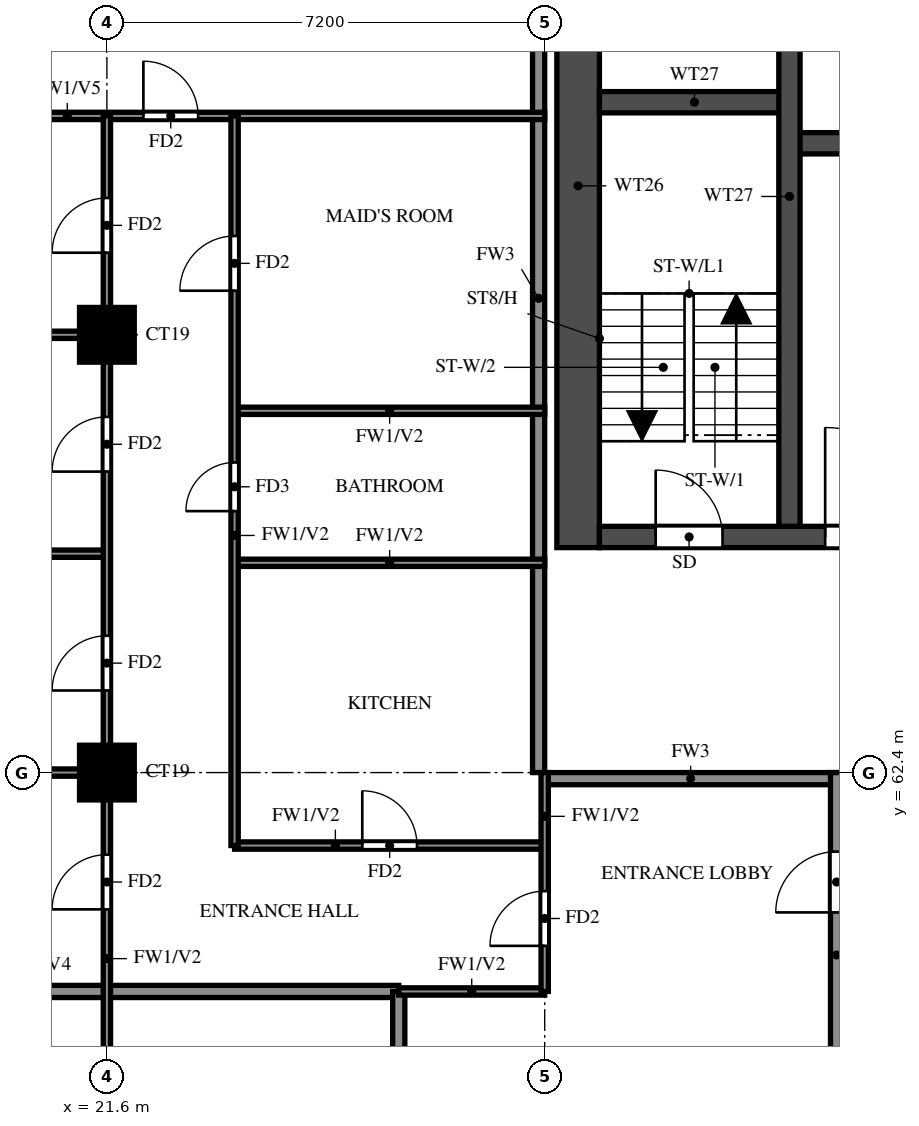
"""IFC4 building model, lengths in metres.
Left out: names, types, materials, properties, quantities, classifications, styles, units other than length and angle.
Written with IfcOpenShell. Run it as: python <this file> out.ifc"""

import sys

from ifc_helpers import new_model, si_unit, direction, frame, frame_2d, origin, origin_2d, place, context, subcontext, project, spatial, rectangle, extrude, source, transform, mapped, element, fill, save


model = new_model("IFC4")
c1 = context("Model", 3, precision=1e-05, world=origin(), true_north=direction((0.0, 1.0)))
c2 = subcontext(c1, "Body", "Model", "MODEL_VIEW")
j1 = project(units=[si_unit("LENGTHUNIT", "METRE"), si_unit("PLANEANGLEUNIT", "RADIAN")], contexts=[c1])
p1 = place(None, origin())
s1 = spatial("IfcSite", under=j1, at=p1, CompositionType="ELEMENT")
p2 = place(p1, origin())
s2 = spatial("IfcBuilding", under=s1, at=p2, CompositionType="ELEMENT")
p3 = place(p2, frame((0.0, 0.0, 185.0)))
s3 = spatial("IfcBuildingStorey", under=s2, at=p3, CompositionType="ELEMENT", Elevation=185.0)
m1 = source(origin(), c2, "Body", "SweptSolid", [
    extrude(rectangle(XDim=0.9, YDim=0.9, at=origin_2d()), origin(), (0.0, 0.0, 1.0), 3.2),
])
for number, where, z_axis, x_axis in (
    (1, (21.6, 62.4, 0.0), (0.0, 0.0, 1.0), (1.0, 0.0, 0.0)),
    (2, (21.6, 69.6, 0.0), (0.0, 0.0, 1.0), (1.0, 0.0, 0.0)),
):
    element("IfcColumn", number, at=place(p3, frame(where, z_axis=z_axis, x_axis=x_axis)), inside=s3, PredefinedType="COLUMN", context=c2, shape_type="MappedRepresentation", body=[
        mapped(m1, transform((0.0, 0.0, 0.0))),
    ])
p4 = place(p3, frame((29.35, 66.1, 0.0), z_axis=(0.0, 0.0, 1.0), x_axis=(0.0, 1.0, 0.0)))
e3 = element("IfcWall", 3, at=p4, inside=s3, PredefinedType="SHEAR", context=c2, shape_type="SweptSolid", body=[
    extrude(rectangle(XDim=11.9, YDim=0.7, at=frame_2d((5.95, 0.0))), origin(), (0.0, 0.0, 1.0), 3.2),
])
p5 = place(p3, frame((29.7, 66.275, 0.0), z_axis=(0.0, 0.0, 1.0), x_axis=(1.0, 0.0, 0.0)))
e4 = element("IfcWall", 4, at=p5, inside=s3, PredefinedType="SHEAR", context=c2, shape_type="SweptSolid", body=[
    extrude(rectangle(XDim=41.4, YDim=0.35, at=frame_2d((20.7, 0.0))), origin(), (0.0, 0.0, 1.0), 3.2),
])
p6 = place(p5, frame((0.925, 0.0, 0.0)))
e5 = element("IfcOpeningElement", 5, at=p6, cuts=e4, PredefinedType="OPENING", context=c2, shape_type="SweptSolid", body=[
    extrude(rectangle(XDim=1.1, YDim=2.1, at=frame_2d((0.55, 1.05))), frame((0.0, 0.185, 0.0), z_axis=(0.0, -1.0, 0.0), x_axis=(1.0, 0.0, 0.0)), (0.0, 0.0, 1.0), 0.37),
])
p7 = place(p5, frame((3.712, 0.0, 0.0)))
e6 = element("IfcOpeningElement", 6, at=p7, cuts=e4, PredefinedType="OPENING", context=c2, shape_type="SweptSolid", body=[
    extrude(rectangle(XDim=1.8, YDim=2.1, at=frame_2d((0.9, 1.05))), frame((0.0, 0.185, 0.0), z_axis=(0.0, -1.0, 0.0), x_axis=(1.0, 0.0, 0.0)), (0.0, 0.0, 1.0), 0.37),
])
p8 = place(p3, frame((32.825, 72.75, 0.0), z_axis=(0.0, 0.0, 1.0), x_axis=(1.0, 0.0, 0.0)))
e7 = element("IfcWall", 7, at=p8, inside=s3, PredefinedType="SHEAR", context=c2, shape_type="SweptSolid", body=[
    extrude(rectangle(XDim=35.15, YDim=0.35, at=frame_2d((17.575, 0.0))), origin(), (0.0, 0.0, 1.0), 3.2),
])
p9 = place(p8, frame((19.8, 0.0, 0.0)))
e8 = element("IfcOpeningElement", 8, at=p9, cuts=e7, PredefinedType="OPENING", context=c2, shape_type="SweptSolid", body=[
    extrude(rectangle(XDim=1.1, YDim=2.1, at=frame_2d((0.55, 1.05))), frame((0.0, 0.185, 0.0), z_axis=(0.0, -1.0, 0.0), x_axis=(1.0, 0.0, 0.0)), (0.0, 0.0, 1.0), 0.37),
])
p10 = place(p8, frame((27.7, 0.0, 0.0)))
e9 = element("IfcOpeningElement", 9, at=p10, cuts=e7, PredefinedType="OPENING", context=c2, shape_type="SweptSolid", body=[
    extrude(rectangle(XDim=1.1, YDim=2.1, at=frame_2d((0.55, 1.05))), frame((0.0, 0.185, 0.0), z_axis=(0.0, -1.0, 0.0), x_axis=(1.0, 0.0, 0.0)), (0.0, 0.0, 1.0), 0.37),
])
p11 = place(p8, frame((30.3, 0.0, 0.0)))
e10 = element("IfcOpeningElement", 10, at=p11, cuts=e7, PredefinedType="OPENING", context=c2, shape_type="SweptSolid", body=[
    extrude(rectangle(XDim=1.1, YDim=2.1, at=frame_2d((0.55, 1.05))), frame((0.0, 0.185, 0.0), z_axis=(0.0, -1.0, 0.0), x_axis=(1.0, 0.0, 0.0)), (0.0, 0.0, 1.0), 0.37),
])
p12 = place(p8, frame((3.8, 0.0, 0.0)))
e11 = element("IfcOpeningElement", 11, at=p12, cuts=e7, PredefinedType="OPENING", context=c2, shape_type="SweptSolid", body=[
    extrude(rectangle(XDim=1.1, YDim=2.1, at=frame_2d((0.55, 1.05))), frame((0.0, 0.185, 0.0), z_axis=(0.0, -1.0, 0.0), x_axis=(1.0, 0.0, 0.0)), (0.0, 0.0, 1.0), 0.37),
])
p13 = place(p8, frame((6.55, 0.0, 0.0)))
e12 = element("IfcOpeningElement", 12, at=p13, cuts=e7, PredefinedType="OPENING", context=c2, shape_type="SweptSolid", body=[
    extrude(rectangle(XDim=1.1, YDim=2.1, at=frame_2d((0.55, 1.05))), frame((0.0, 0.185, 0.0), z_axis=(0.0, -1.0, 0.0), x_axis=(1.0, 0.0, 0.0)), (0.0, 0.0, 1.0), 0.37),
])
p14 = place(p8, frame((9.3, 0.0, 0.0)))
e13 = element("IfcOpeningElement", 13, at=p14, cuts=e7, PredefinedType="OPENING", context=c2, shape_type="SweptSolid", body=[
    extrude(rectangle(XDim=1.1, YDim=2.1, at=frame_2d((0.55, 1.05))), frame((0.0, 0.185, 0.0), z_axis=(0.0, -1.0, 0.0), x_axis=(1.0, 0.0, 0.0)), (0.0, 0.0, 1.0), 0.37),
])
p15 = place(p8, frame((12.05, 0.0, 0.0)))
e14 = element("IfcOpeningElement", 14, at=p15, cuts=e7, PredefinedType="OPENING", context=c2, shape_type="SweptSolid", body=[
    extrude(rectangle(XDim=1.1, YDim=2.1, at=frame_2d((0.55, 1.05))), frame((0.0, 0.185, 0.0), z_axis=(0.0, -1.0, 0.0), x_axis=(1.0, 0.0, 0.0)), (0.0, 0.0, 1.0), 0.37),
])
p16 = place(p8, frame((14.8, 0.0, 0.0)))
e15 = element("IfcOpeningElement", 15, at=p16, cuts=e7, PredefinedType="OPENING", context=c2, shape_type="SweptSolid", body=[
    extrude(rectangle(XDim=1.1, YDim=2.1, at=frame_2d((0.55, 1.05))), frame((0.0, 0.185, 0.0), z_axis=(0.0, -1.0, 0.0), x_axis=(1.0, 0.0, 0.0)), (0.0, 0.0, 1.0), 0.37),
])
p17 = place(p8, frame((17.55, 0.0, 0.0)))
e16 = element("IfcOpeningElement", 16, at=p17, cuts=e7, PredefinedType="OPENING", context=c2, shape_type="SweptSolid", body=[
    extrude(rectangle(XDim=1.1, YDim=2.1, at=frame_2d((0.55, 1.05))), frame((0.0, 0.185, 0.0), z_axis=(0.0, -1.0, 0.0), x_axis=(1.0, 0.0, 0.0)), (0.0, 0.0, 1.0), 0.37),
])
p18 = place(p8, frame((0.938, 0.0, 0.0)))
e17 = element("IfcOpeningElement", 17, at=p18, cuts=e7, PredefinedType="OPENING", context=c2, shape_type="SweptSolid", body=[
    extrude(rectangle(XDim=1.1, YDim=2.1, at=frame_2d((0.55, 1.05))), frame((0.0, 0.185, 0.0), z_axis=(0.0, -1.0, 0.0), x_axis=(1.0, 0.0, 0.0)), (0.0, 0.0, 1.0), 0.37),
])
p19 = place(p3, frame((29.7, 73.425, 0.0), z_axis=(0.0, 0.0, 1.0), x_axis=(1.0, 0.0, 0.0)))
e18 = element("IfcWall", 18, at=p19, inside=s3, PredefinedType="SHEAR", context=c2, shape_type="SweptSolid", body=[
    extrude(rectangle(XDim=3.125, YDim=0.35, at=frame_2d((1.562, 0.0))), origin(), (0.0, 0.0, 1.0), 3.2),
])
p20 = place(p3, frame((32.825, 66.45, 0.0), z_axis=(0.0, 0.0, 1.0), x_axis=(0.0, 1.0, 0.0)))
e19 = element("IfcWall", 19, at=p20, inside=s3, PredefinedType="SHEAR", context=c2, shape_type="SweptSolid", body=[
    extrude(rectangle(XDim=10.85, YDim=0.35, at=frame_2d((5.425, 0.0))), origin(), (0.0, 0.0, 1.0), 3.2),
])
p21 = place(p3, frame((28.8, 62.3, 0.0), z_axis=(0.0, 0.0, 1.0), x_axis=(1.0, 0.0, 0.0)))
e20 = element("IfcWall", 20, at=p21, inside=s3, PredefinedType="SOLIDWALL", context=c2, shape_type="SweptSolid", body=[
    extrude(rectangle(XDim=4.8, YDim=0.2, at=frame_2d((2.4, 0.0))), origin(), (0.0, 0.0, 1.0), 3.2),
])
p22 = place(p3, frame((28.7, 62.4, 0.0), z_axis=(0.0, 0.0, 1.0), x_axis=(0.0, 1.0, 0.0)))
e21 = element("IfcWall", 21, at=p22, inside=s3, PredefinedType="SOLIDWALL", context=c2, shape_type="SweptSolid", body=[
    extrude(rectangle(XDim=15.6, YDim=0.2, at=frame_2d((7.8, 0.0))), origin(), (0.0, 0.0, 1.0), 3.2),
])
p23 = place(p3, frame((33.6, 56.4, 0.0), z_axis=(0.0, 0.0, 1.0), x_axis=(0.0, 1.0, 0.0)))
e22 = element("IfcWall", 22, at=p23, inside=s3, PredefinedType="SOLIDWALL", context=c2, shape_type="SweptSolid", body=[
    extrude(rectangle(XDim=6.0, YDim=0.2, at=frame_2d((3.0, 0.0))), origin(), (0.0, 0.0, 1.0), 3.2),
])
p24 = place(p23, frame((3.7, 0.0, 0.0)))
e23 = element("IfcOpeningElement", 23, at=p24, cuts=e22, PredefinedType="OPENING", context=c2, shape_type="SweptSolid", body=[
    extrude(rectangle(XDim=1.0, YDim=2.1, at=frame_2d((0.5, 1.05))), frame((0.0, 0.11, 0.0), z_axis=(0.0, -1.0, 0.0), x_axis=(1.0, 0.0, 0.0)), (0.0, 0.0, 1.0), 0.22),
])
p25 = place(p3, frame((14.525, 58.8, 0.0), z_axis=(0.0, 0.0, 1.0), x_axis=(1.0, 0.0, 0.0)))
e24 = element("IfcWall", 24, at=p25, inside=s3, PredefinedType="SOLIDWALL", context=c2, shape_type="SweptSolid", body=[
    extrude(rectangle(XDim=11.875, YDim=0.2, at=frame_2d((5.938, 0.0))), origin(), (0.0, 0.0, 1.0), 2.3),
])
p26 = place(p3, frame((26.4, 56.4, 0.0), z_axis=(0.0, 0.0, 1.0), x_axis=(0.0, 1.0, 0.0)))
e25 = element("IfcWall", 25, at=p26, inside=s3, PredefinedType="SOLIDWALL", context=c2, shape_type="SweptSolid", body=[
    extrude(rectangle(XDim=2.4, YDim=0.2, at=frame_2d((1.2, 0.0))), origin(), (0.0, 0.0, 1.0), 3.2),
])
p27 = place(p3, frame((26.4, 58.8, 0.0), z_axis=(0.0, 0.0, 1.0), x_axis=(1.0, 0.0, 0.0)))
e26 = element("IfcWall", 26, at=p27, inside=s3, PredefinedType="PARTITIONING", context=c2, shape_type="SweptSolid", body=[
    extrude(rectangle(XDim=2.4, YDim=0.12, at=frame_2d((1.2, 0.0))), origin(), (0.0, 0.0, 1.0), 3.2),
])
p28 = place(p3, frame((23.7, 61.2, 0.0), z_axis=(0.0, 0.0, 1.0), x_axis=(1.0, 0.0, 0.0)))
e27 = element("IfcWall", 27, at=p28, inside=s3, PredefinedType="PARTITIONING", context=c2, shape_type="SweptSolid", body=[
    extrude(rectangle(XDim=5.1, YDim=0.12, at=frame_2d((2.55, 0.0))), origin(), (0.0, 0.0, 1.0), 3.2),
])
p29 = place(p28, frame((2.1, 0.0, 0.0)))
e28 = element("IfcOpeningElement", 28, at=p29, cuts=e27, PredefinedType="OPENING", context=c2, shape_type="SweptSolid", body=[
    extrude(rectangle(XDim=0.9, YDim=2.1, at=frame_2d((0.45, 1.05))), frame((0.0, 0.07, 0.0), z_axis=(0.0, -1.0, 0.0), x_axis=(1.0, 0.0, 0.0)), (0.0, 0.0, 1.0), 0.14),
])
p30 = place(p3, frame((14.525, 62.4, 0.0), z_axis=(0.0, 0.0, 1.0), x_axis=(1.0, 0.0, 0.0)))
e29 = element("IfcWall", 29, at=p30, inside=s3, PredefinedType="PARTITIONING", context=c2, shape_type="SweptSolid", body=[
    extrude(rectangle(XDim=7.075, YDim=0.12, at=frame_2d((3.538, 0.0))), origin(), (0.0, 0.0, 1.0), 3.2),
])
p31 = place(p3, frame((23.7, 65.85, 0.0), z_axis=(0.0, 0.0, 1.0), x_axis=(1.0, 0.0, 0.0)))
e30 = element("IfcWall", 30, at=p31, inside=s3, PredefinedType="PARTITIONING", context=c2, shape_type="SweptSolid", body=[
    extrude(rectangle(XDim=5.1, YDim=0.12, at=frame_2d((2.55, 0.0))), origin(), (0.0, 0.0, 1.0), 3.2),
])
p32 = place(p3, frame((14.525, 66.0, 0.0), z_axis=(0.0, 0.0, 1.0), x_axis=(1.0, 0.0, 0.0)))
e31 = element("IfcWall", 31, at=p32, inside=s3, PredefinedType="PARTITIONING", context=c2, shape_type="SweptSolid", body=[
    extrude(rectangle(XDim=7.075, YDim=0.12, at=frame_2d((3.538, 0.0))), origin(), (0.0, 0.0, 1.0), 2.3),
])
p33 = place(p3, frame((23.7, 68.35, 0.0), z_axis=(0.0, 0.0, 1.0), x_axis=(1.0, 0.0, 0.0)))
e32 = element("IfcWall", 32, at=p33, inside=s3, PredefinedType="PARTITIONING", context=c2, shape_type="SweptSolid", body=[
    extrude(rectangle(XDim=5.1, YDim=0.12, at=frame_2d((2.55, 0.0))), origin(), (0.0, 0.0, 1.0), 3.2),
])
p34 = place(p3, frame((14.525, 69.6, 0.0), z_axis=(0.0, 0.0, 1.0), x_axis=(1.0, 0.0, 0.0)))
e33 = element("IfcWall", 33, at=p34, inside=s3, PredefinedType="PARTITIONING", context=c2, shape_type="SweptSolid", body=[
    extrude(rectangle(XDim=7.075, YDim=0.12, at=frame_2d((3.538, 0.0))), origin(), (0.0, 0.0, 1.0), 3.2),
])
p35 = place(p3, frame((14.525, 73.2, 0.0), z_axis=(0.0, 0.0, 1.0), x_axis=(1.0, 0.0, 0.0)))
e34 = element("IfcWall", 34, at=p35, inside=s3, PredefinedType="PARTITIONING", context=c2, shape_type="SweptSolid", body=[
    extrude(rectangle(XDim=14.275, YDim=0.12, at=frame_2d((7.138, 0.0))), origin(), (0.0, 0.0, 1.0), 2.3),
])
p36 = place(p35, frame((7.675, 0.0, 0.0)))
e35 = element("IfcOpeningElement", 35, at=p36, cuts=e34, PredefinedType="OPENING", context=c2, shape_type="SweptSolid", body=[
    extrude(rectangle(XDim=0.9, YDim=2.1, at=frame_2d((0.45, 1.05))), frame((0.0, 0.07, 0.0), z_axis=(0.0, -1.0, 0.0), x_axis=(1.0, 0.0, 0.0)), (0.0, 0.0, 1.0), 0.14),
])
p37 = place(p3, frame((21.6, 48.0, 0.0), z_axis=(0.0, 0.0, 1.0), x_axis=(0.0, 1.0, 0.0)))
e36 = element("IfcWall", 36, at=p37, inside=s3, PredefinedType="PARTITIONING", context=c2, shape_type="SweptSolid", body=[
    extrude(rectangle(XDim=25.2, YDim=0.12, at=frame_2d((12.6, 0.0))), origin(), (0.0, 0.0, 1.0), 3.2),
])
p38 = place(p37, frame((1.35, 0.0, 0.0)))
e37 = element("IfcOpeningElement", 37, at=p38, cuts=e36, PredefinedType="OPENING", context=c2, shape_type="SweptSolid", body=[
    extrude(rectangle(XDim=0.9, YDim=2.1, at=frame_2d((0.45, 1.05))), frame((0.0, 0.07, 0.0), z_axis=(0.0, -1.0, 0.0), x_axis=(1.0, 0.0, 0.0)), (0.0, 0.0, 1.0), 0.14),
])
p39 = place(p37, frame((4.95, 0.0, 0.0)))
e38 = element("IfcOpeningElement", 38, at=p39, cuts=e36, PredefinedType="OPENING", context=c2, shape_type="SweptSolid", body=[
    extrude(rectangle(XDim=0.9, YDim=2.1, at=frame_2d((0.45, 1.05))), frame((0.0, 0.07, 0.0), z_axis=(0.0, -1.0, 0.0), x_axis=(1.0, 0.0, 0.0)), (0.0, 0.0, 1.0), 0.14),
])
p40 = place(p37, frame((8.25, 0.0, 0.0)))
e39 = element("IfcOpeningElement", 39, at=p40, cuts=e36, PredefinedType="OPENING", context=c2, shape_type="SweptSolid", body=[
    extrude(rectangle(XDim=1.5, YDim=2.1, at=frame_2d((0.75, 1.05))), frame((0.0, 0.07, 0.0), z_axis=(0.0, -1.0, 0.0), x_axis=(1.0, 0.0, 0.0)), (0.0, 0.0, 1.0), 0.14),
])
p41 = place(p37, frame((12.15, 0.0, 0.0)))
e40 = element("IfcOpeningElement", 40, at=p41, cuts=e36, PredefinedType="OPENING", context=c2, shape_type="SweptSolid", body=[
    extrude(rectangle(XDim=0.9, YDim=2.1, at=frame_2d((0.45, 1.05))), frame((0.0, 0.07, 0.0), z_axis=(0.0, -1.0, 0.0), x_axis=(1.0, 0.0, 0.0)), (0.0, 0.0, 1.0), 0.14),
])
p42 = place(p37, frame((15.75, 0.0, 0.0)))
e41 = element("IfcOpeningElement", 41, at=p42, cuts=e36, PredefinedType="OPENING", context=c2, shape_type="SweptSolid", body=[
    extrude(rectangle(XDim=0.9, YDim=2.1, at=frame_2d((0.45, 1.05))), frame((0.0, 0.07, 0.0), z_axis=(0.0, -1.0, 0.0), x_axis=(1.0, 0.0, 0.0)), (0.0, 0.0, 1.0), 0.14),
])
p43 = place(p37, frame((19.35, 0.0, 0.0)))
e42 = element("IfcOpeningElement", 42, at=p43, cuts=e36, PredefinedType="OPENING", context=c2, shape_type="SweptSolid", body=[
    extrude(rectangle(XDim=0.9, YDim=2.1, at=frame_2d((0.45, 1.05))), frame((0.0, 0.07, 0.0), z_axis=(0.0, -1.0, 0.0), x_axis=(1.0, 0.0, 0.0)), (0.0, 0.0, 1.0), 0.14),
])
p44 = place(p37, frame((22.95, 0.0, 0.0)))
e43 = element("IfcOpeningElement", 43, at=p44, cuts=e36, PredefinedType="OPENING", context=c2, shape_type="SweptSolid", body=[
    extrude(rectangle(XDim=0.9, YDim=2.1, at=frame_2d((0.45, 1.05))), frame((0.0, 0.07, 0.0), z_axis=(0.0, -1.0, 0.0), x_axis=(1.0, 0.0, 0.0)), (0.0, 0.0, 1.0), 0.14),
])
p45 = place(p3, frame((23.7, 61.2, 0.0), z_axis=(0.0, 0.0, 1.0), x_axis=(0.0, 1.0, 0.0)))
e44 = element("IfcWall", 44, at=p45, inside=s3, PredefinedType="PARTITIONING", context=c2, shape_type="SweptSolid", body=[
    extrude(rectangle(XDim=12.0, YDim=0.12, at=frame_2d((6.0, 0.0))), origin(), (0.0, 0.0, 1.0), 3.2),
])
p46 = place(p45, frame((5.5, 0.0, 0.0)))
e45 = element("IfcOpeningElement", 45, at=p46, cuts=e44, PredefinedType="OPENING", context=c2, shape_type="SweptSolid", body=[
    extrude(rectangle(XDim=0.8, YDim=2.1, at=frame_2d((0.4, 1.05))), frame((0.0, 0.07, 0.0), z_axis=(0.0, -1.0, 0.0), x_axis=(1.0, 0.0, 0.0)), (0.0, 0.0, 1.0), 0.14),
])
p47 = place(p45, frame((9.125, 0.0, 0.0)))
e46 = element("IfcOpeningElement", 46, at=p47, cuts=e44, PredefinedType="OPENING", context=c2, shape_type="SweptSolid", body=[
    extrude(rectangle(XDim=0.9, YDim=2.1, at=frame_2d((0.45, 1.05))), frame((0.0, 0.07, 0.0), z_axis=(0.0, -1.0, 0.0), x_axis=(1.0, 0.0, 0.0)), (0.0, 0.0, 1.0), 0.14),
])
p48 = place(p3, frame((28.8, 58.8, 0.0), z_axis=(0.0, 0.0, 1.0), x_axis=(0.0, 1.0, 0.0)))
e47 = element("IfcWall", 47, at=p48, inside=s3, PredefinedType="PARTITIONING", context=c2, shape_type="SweptSolid", body=[
    extrude(rectangle(XDim=3.6, YDim=0.12, at=frame_2d((1.8, 0.0))), origin(), (0.0, 0.0, 1.0), 3.2),
])
p49 = place(p48, frame((0.75, 0.0, 0.0)))
e48 = element("IfcOpeningElement", 48, at=p49, cuts=e47, PredefinedType="OPENING", context=c2, shape_type="SweptSolid", body=[
    extrude(rectangle(XDim=0.9, YDim=2.1, at=frame_2d((0.45, 1.05))), frame((0.0, 0.07, 0.0), z_axis=(0.0, -1.0, 0.0), x_axis=(1.0, 0.0, 0.0)), (0.0, 0.0, 1.0), 0.14),
])
p50 = place(p6, origin())
e49 = element("IfcDoor", 49, at=p50, inside=s3, OperationType="SINGLE_SWING_LEFT", PredefinedType="DOOR", context=c2, shape_type="SweptSolid", body=[
    extrude(rectangle(XDim=1.1, YDim=2.1, at=frame_2d((0.55, 1.05))), frame((0.0, 0.025, 0.0), z_axis=(0.0, -1.0, 0.0), x_axis=(1.0, 0.0, 0.0)), (0.0, 0.0, 1.0), 0.05),
])
fill(e5, e49)
p51 = place(p7, origin())
e50 = element("IfcDoor", 50, at=p51, inside=s3, OperationType="DOUBLE_DOOR_SINGLE_SWING", PredefinedType="DOOR", context=c2, shape_type="SweptSolid", body=[
    extrude(rectangle(XDim=1.8, YDim=2.1, at=frame_2d((0.9, 1.05))), frame((0.0, 0.025, 0.0), z_axis=(0.0, -1.0, 0.0), x_axis=(1.0, 0.0, 0.0)), (0.0, 0.0, 1.0), 0.05),
])
fill(e6, e50)
p52 = place(p49, origin())
e51 = element("IfcDoor", 51, at=p52, inside=s3, OperationType="SINGLE_SWING_RIGHT", PredefinedType="DOOR", context=c2, shape_type="SweptSolid", body=[
    extrude(rectangle(XDim=0.9, YDim=2.1, at=frame_2d((0.45, 1.05))), frame((0.0, 0.025, 0.0), z_axis=(0.0, -1.0, 0.0), x_axis=(1.0, 0.0, 0.0)), (0.0, 0.0, 1.0), 0.05),
])
fill(e48, e51)
p53 = place(p24, origin())
e52 = element("IfcDoor", 52, at=p53, inside=s3, OperationType="SINGLE_SWING_LEFT", PredefinedType="DOOR", context=c2, shape_type="SweptSolid", body=[
    extrude(rectangle(XDim=1.0, YDim=2.1, at=frame_2d((0.5, 1.05))), frame((0.0, 0.025, 0.0), z_axis=(0.0, -1.0, 0.0), x_axis=(1.0, 0.0, 0.0)), (0.0, 0.0, 1.0), 0.05),
])
fill(e23, e52)
p54 = place(p41, origin())
e53 = element("IfcDoor", 53, at=p54, inside=s3, OperationType="SINGLE_SWING_LEFT", PredefinedType="DOOR", context=c2, shape_type="SweptSolid", body=[
    extrude(rectangle(XDim=0.9, YDim=2.1, at=frame_2d((0.45, 1.05))), frame((0.0, 0.025, 0.0), z_axis=(0.0, -1.0, 0.0), x_axis=(1.0, 0.0, 0.0)), (0.0, 0.0, 1.0), 0.05),
])
fill(e40, e53)
p55 = place(p42, origin())
e54 = element("IfcDoor", 54, at=p55, inside=s3, OperationType="SINGLE_SWING_RIGHT", PredefinedType="DOOR", context=c2, shape_type="SweptSolid", body=[
    extrude(rectangle(XDim=0.9, YDim=2.1, at=frame_2d((0.45, 1.05))), frame((0.0, 0.025, 0.0), z_axis=(0.0, -1.0, 0.0), x_axis=(1.0, 0.0, 0.0)), (0.0, 0.0, 1.0), 0.05),
])
fill(e41, e54)
p56 = place(p43, origin())
e55 = element("IfcDoor", 55, at=p56, inside=s3, OperationType="SINGLE_SWING_LEFT", PredefinedType="DOOR", context=c2, shape_type="SweptSolid", body=[
    extrude(rectangle(XDim=0.9, YDim=2.1, at=frame_2d((0.45, 1.05))), frame((0.0, 0.025, 0.0), z_axis=(0.0, -1.0, 0.0), x_axis=(1.0, 0.0, 0.0)), (0.0, 0.0, 1.0), 0.05),
])
fill(e42, e55)
p57 = place(p44, origin())
e56 = element("IfcDoor", 56, at=p57, inside=s3, OperationType="SINGLE_SWING_LEFT", PredefinedType="DOOR", context=c2, shape_type="SweptSolid", body=[
    extrude(rectangle(XDim=0.9, YDim=2.1, at=frame_2d((0.45, 1.05))), frame((0.0, 0.025, 0.0), z_axis=(0.0, -1.0, 0.0), x_axis=(1.0, 0.0, 0.0)), (0.0, 0.0, 1.0), 0.05),
])
fill(e43, e56)
p58 = place(p36, origin())
e57 = element("IfcDoor", 57, at=p58, inside=s3, OperationType="SINGLE_SWING_RIGHT", PredefinedType="DOOR", context=c2, shape_type="SweptSolid", body=[
    extrude(rectangle(XDim=0.9, YDim=2.1, at=frame_2d((0.45, 1.05))), frame((0.0, 0.025, 0.0), z_axis=(0.0, -1.0, 0.0), x_axis=(1.0, 0.0, 0.0)), (0.0, 0.0, 1.0), 0.05),
])
fill(e35, e57)
p59 = place(p29, origin())
e58 = element("IfcDoor", 58, at=p59, inside=s3, OperationType="SINGLE_SWING_LEFT", PredefinedType="DOOR", context=c2, shape_type="SweptSolid", body=[
    extrude(rectangle(XDim=0.9, YDim=2.1, at=frame_2d((0.45, 1.05))), frame((0.0, 0.025, 0.0), z_axis=(0.0, -1.0, 0.0), x_axis=(1.0, 0.0, 0.0)), (0.0, 0.0, 1.0), 0.05),
])
fill(e28, e58)
p60 = place(p46, origin())
e59 = element("IfcDoor", 59, at=p60, inside=s3, OperationType="SINGLE_SWING_LEFT", PredefinedType="DOOR", context=c2, shape_type="SweptSolid", body=[
    extrude(rectangle(XDim=0.8, YDim=2.1, at=frame_2d((0.4, 1.05))), frame((0.0, 0.025, 0.0), z_axis=(0.0, -1.0, 0.0), x_axis=(1.0, 0.0, 0.0)), (0.0, 0.0, 1.0), 0.05),
])
fill(e45, e59)
p61 = place(p47, origin())
e60 = element("IfcDoor", 60, at=p61, inside=s3, OperationType="SINGLE_SWING_RIGHT", PredefinedType="DOOR", context=c2, shape_type="SweptSolid", body=[
    extrude(rectangle(XDim=0.9, YDim=2.1, at=frame_2d((0.45, 1.05))), frame((0.0, 0.025, 0.0), z_axis=(0.0, -1.0, 0.0), x_axis=(1.0, 0.0, 0.0)), (0.0, 0.0, 1.0), 0.05),
])
fill(e46, e60)
save(model, sys.argv[1])
